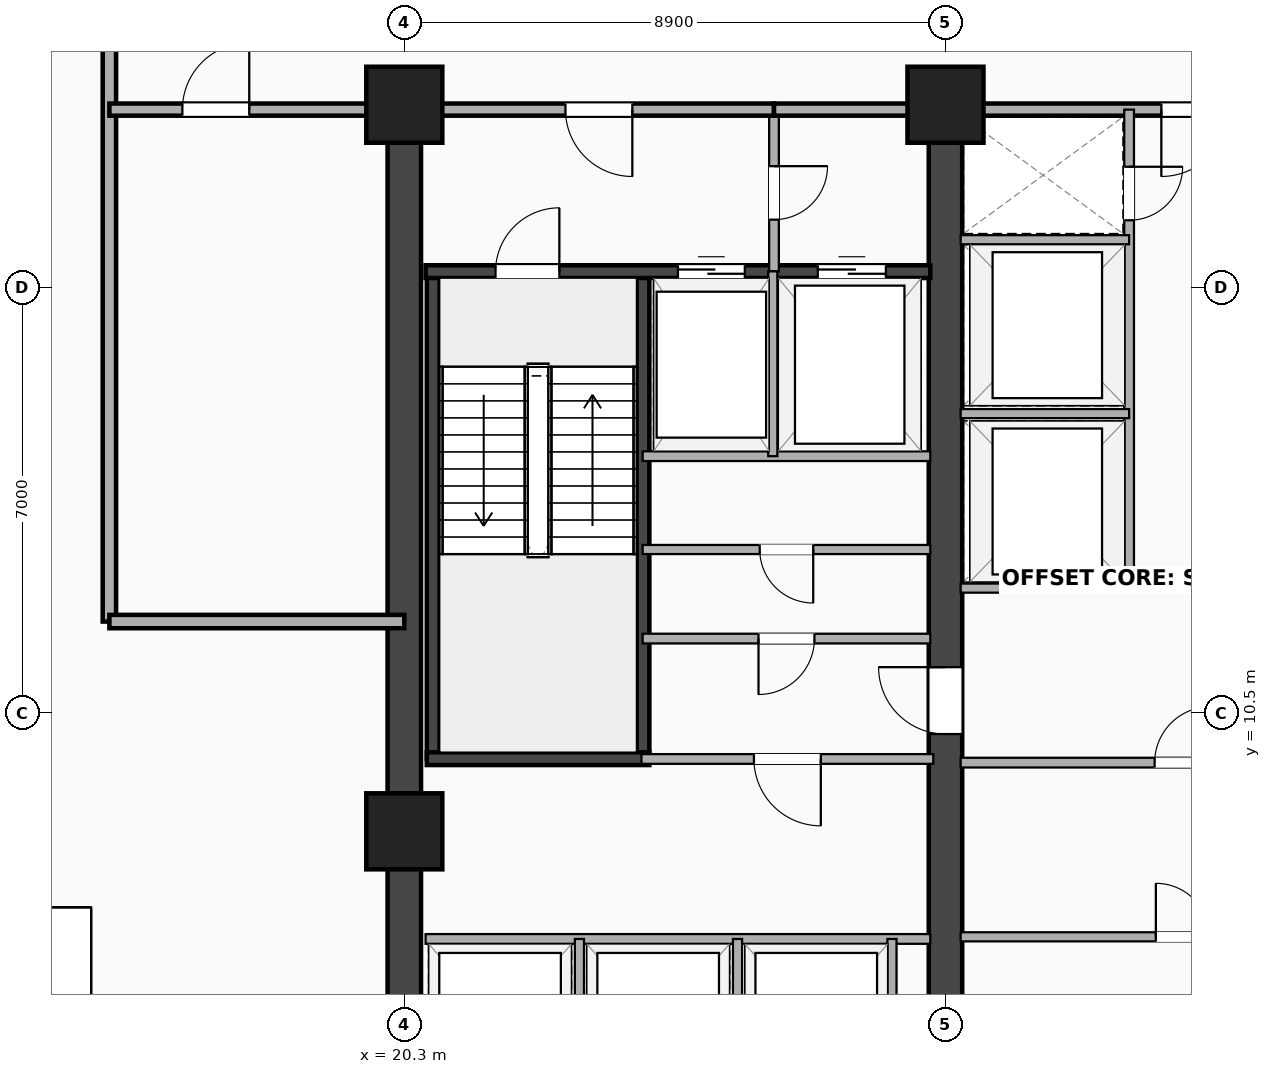
"""IFC4 building model, lengths in metres.
Left out: names, types, materials, properties, quantities, classifications, styles, units other than length and angle.
Written with IfcOpenShell. Run it as: python <this file> out.ifc"""

import sys

from ifc_helpers import new_model, si_unit, direction, frame, frame_2d, origin, origin_2d, place, context, subcontext, project, spatial, rectangle, extrude, element, fill, save


model = new_model("IFC4")
c1 = context("Model", 3, precision=1e-05, world=origin(), true_north=direction((0.0, 1.0)))
c2 = subcontext(c1, "Body", "Model", "MODEL_VIEW")
j1 = project(units=[si_unit("LENGTHUNIT", "METRE"), si_unit("PLANEANGLEUNIT", "RADIAN")], contexts=[c1])
p1 = place(None, origin())
s1 = spatial("IfcSite", under=j1, at=p1, CompositionType="ELEMENT")
p2 = place(p1, origin())
s2 = spatial("IfcBuilding", under=s1, at=p2, CompositionType="ELEMENT")
p3 = place(p2, frame((0.0, 0.0, 130.2)))
s3 = spatial("IfcBuildingStorey", under=s2, at=p3, CompositionType="ELEMENT", Elevation=130.2)
p4 = place(p3, frame((20.3, 3.5, 0.0), z_axis=(0.0, 0.0, 1.0), x_axis=(0.0, 1.0, 0.0)))
e1 = element("IfcWall", 1, at=p4, inside=s3, PredefinedType="SHEAR", context=c2, shape_type="SweptSolid", body=[
    extrude(rectangle(XDim=16.9, YDim=0.55, at=frame_2d((8.45, 0.0))), origin(), (0.0, 0.0, 1.0), 8.15),
])
p5 = place(p3, frame((29.2, 3.5, 0.0), z_axis=(0.0, 0.0, 1.0), x_axis=(0.0, 1.0, 0.0)))
e2 = element("IfcWall", 2, at=p5, inside=s3, PredefinedType="SHEAR", context=c2, shape_type="SweptSolid", body=[
    extrude(rectangle(XDim=16.9, YDim=0.55, at=frame_2d((8.45, 0.0))), origin(), (0.0, 0.0, 1.0), 8.15),
])
p6 = place(p5, frame((7.75, 0.0, 0.0), z_axis=(0.0, 0.0, 1.0), x_axis=(-1.0, 0.0, 0.0)))
e3 = element("IfcOpeningElement", 3, at=p6, cuts=e2, PredefinedType="OPENING", context=c2, shape_type="SweptSolid", body=[
    extrude(rectangle(XDim=1.1, YDim=2.15, at=frame_2d((0.55, 1.075))), frame((0.0, 0.285, 0.0), z_axis=(0.0, -1.0, 0.0), x_axis=(1.0, 0.0, 0.0)), (0.0, 0.0, 1.0), 0.57),
])
for number, where, z_axis, x_axis in (
    (4, (20.775, 9.745, 0.0), (0.0, 0.0, 1.0), (0.0, 1.0, 0.0)),
    (5, (24.225, 9.745, 0.0), (0.0, 0.0, 1.0), (0.0, 1.0, 0.0)),
):
    element("IfcWall", number, at=place(p3, frame(where, z_axis=z_axis, x_axis=x_axis)), inside=s3, PredefinedType="SHEAR", context=c2, shape_type="SweptSolid", body=[
        extrude(rectangle(XDim=8.01, YDim=0.21, at=frame_2d((4.005, 0.0))), origin(), (0.0, 0.0, 1.0), 8.15),
    ])
p7 = place(p3, frame((20.67, 9.745, 0.0), z_axis=(0.0, 0.0, 1.0), x_axis=(1.0, 0.0, 0.0)))
e6 = element("IfcWall", 6, at=p7, inside=s3, PredefinedType="SHEAR", context=c2, shape_type="SweptSolid", body=[
    extrude(rectangle(XDim=3.66, YDim=0.21, at=frame_2d((1.83, 0.0))), origin(), (0.0, 0.0, 1.0), 8.15),
])
p8 = place(p3, frame((20.65, 17.755, 0.0), z_axis=(0.0, 0.0, 1.0), x_axis=(1.0, 0.0, 0.0)))
e7 = element("IfcWall", 7, at=p8, inside=s3, PredefinedType="SHEAR", context=c2, shape_type="SweptSolid", body=[
    extrude(rectangle(XDim=8.3, YDim=0.21, at=frame_2d((4.15, 0.0))), origin(), (0.0, 0.0, 1.0), 8.15),
])
p9 = place(p8, frame((2.2, 0.0, 0.0), z_axis=(0.0, 0.0, 1.0), x_axis=(-1.0, 0.0, 0.0)))
e8 = element("IfcOpeningElement", 8, at=p9, cuts=e7, PredefinedType="OPENING", context=c2, shape_type="SweptSolid", body=[
    extrude(rectangle(XDim=1.05, YDim=2.15, at=frame_2d((0.525, 1.075))), frame((0.0, 0.115, 0.0), z_axis=(0.0, -1.0, 0.0), x_axis=(1.0, 0.0, 0.0)), (0.0, 0.0, 1.0), 0.23),
])
p10 = place(p8, frame((4.15, 0.0, 0.0)))
e9 = element("IfcOpeningElement", 9, at=p10, cuts=e7, PredefinedType="OPENING", context=c2, shape_type="SweptSolid", body=[
    extrude(rectangle(XDim=1.1, YDim=2.18, at=frame_2d((0.55, 1.09))), frame((0.0, 0.115, 0.0), z_axis=(0.0, -1.0, 0.0), x_axis=(1.0, 0.0, 0.0)), (0.0, 0.0, 1.0), 0.23),
])
p11 = place(p8, frame((6.45, 0.0, 0.0)))
e10 = element("IfcOpeningElement", 10, at=p11, cuts=e7, PredefinedType="OPENING", context=c2, shape_type="SweptSolid", body=[
    extrude(rectangle(XDim=1.12, YDim=2.2, at=frame_2d((0.56, 1.1))), frame((0.0, 0.115, 0.0), z_axis=(0.0, -1.0, 0.0), x_axis=(1.0, 0.0, 0.0)), (0.0, 0.0, 1.0), 0.23),
])
for number, where, z_axis, x_axis in (
    (11, (20.3, 8.55, -0.32), (0.0, 0.0, 1.0), (1.0, 0.0, 0.0)),
    (12, (20.3, 20.5, -0.32), (0.0, 0.0, 1.0), (1.0, 0.0, 0.0)),
    (13, (29.2, 20.5, -0.32), (0.0, 0.0, 1.0), (1.0, 0.0, 0.0)),
):
    element("IfcColumn", number, at=place(p3, frame(where, z_axis=z_axis, x_axis=x_axis)), inside=s3, PredefinedType="COLUMN", context=c2, shape_type="SweptSolid", body=[
        extrude(rectangle(XDim=1.25, YDim=1.25, at=origin_2d()), origin(), (0.0, 0.0, 1.0), 8.47),
    ])
p12 = place(p3, frame((26.38, 17.76, 0.0), z_axis=(0.0, 0.0, 1.0), x_axis=(0.0, 1.0, 0.0)))
e14 = element("IfcWall", 14, at=p12, inside=s3, PredefinedType="PARTITIONING", context=c2, shape_type="SweptSolid", body=[
    extrude(rectangle(XDim=2.66, YDim=0.16, at=frame_2d((1.33, 0.0))), origin(), (0.0, 0.0, 1.0), 7.524),
])
p13 = place(p12, frame((0.85, 0.0, 0.0)))
e15 = element("IfcOpeningElement", 15, at=p13, cuts=e14, PredefinedType="OPENING", context=c2, shape_type="SweptSolid", body=[
    extrude(rectangle(XDim=0.88, YDim=2.08, at=frame_2d((0.44, 1.04))), frame((0.0, 0.09, 0.0), z_axis=(0.0, -1.0, 0.0), x_axis=(1.0, 0.0, 0.0)), (0.0, 0.0, 1.0), 0.18),
])
p14 = place(p3, frame((24.22, 14.72, 0.0), z_axis=(0.0, 0.0, 1.0), x_axis=(1.0, 0.0, 0.0)))
e16 = element("IfcWall", 16, at=p14, inside=s3, PredefinedType="PARTITIONING", context=c2, shape_type="SweptSolid", body=[
    extrude(rectangle(XDim=4.73, YDim=0.16, at=frame_2d((2.365, 0.0))), origin(), (0.0, 0.0, 1.0), 8.15),
])
p15 = place(p3, frame((26.36, 14.72, 0.0), z_axis=(0.0, 0.0, 1.0), x_axis=(0.0, 1.0, 0.0)))
e17 = element("IfcWall", 17, at=p15, inside=s3, PredefinedType="PARTITIONING", context=c2, shape_type="SweptSolid", body=[
    extrude(rectangle(XDim=3.04, YDim=0.15, at=frame_2d((1.52, 0.0))), origin(), (0.0, 0.0, 1.0), 8.15),
])
p16 = place(p3, frame((20.65, 20.42, 0.0), z_axis=(0.0, 0.0, 1.0), x_axis=(1.0, 0.0, 0.0)))
e18 = element("IfcWall", 18, at=p16, inside=s3, PredefinedType="PARTITIONING", context=c2, shape_type="SweptSolid", body=[
    extrude(rectangle(XDim=5.73, YDim=0.2, at=frame_2d((2.865, 0.0))), origin(), (0.0, 0.0, 1.0), 7.223),
])
p17 = place(p16, frame((2.3, 0.0, 0.0)))
e19 = element("IfcOpeningElement", 19, at=p17, cuts=e18, PredefinedType="OPENING", context=c2, shape_type="SweptSolid", body=[
    extrude(rectangle(XDim=1.1, YDim=2.15, at=frame_2d((0.55, 1.075))), frame((0.0, 0.11, 0.0), z_axis=(0.0, -1.0, 0.0), x_axis=(1.0, 0.0, 0.0)), (0.0, 0.0, 1.0), 0.22),
])
p18 = place(p3, frame((26.38, 20.42, 0.0), z_axis=(0.0, 0.0, 1.0), x_axis=(1.0, 0.0, 0.0)))
e20 = element("IfcWall", 20, at=p18, inside=s3, PredefinedType="PARTITIONING", context=c2, shape_type="SweptSolid", body=[
    extrude(rectangle(XDim=2.82, YDim=0.2, at=frame_2d((1.41, 0.0))), origin(), (0.0, 0.0, 1.0), 7.223),
])
p19 = place(p3, frame((29.2, 20.42, 0.0), z_axis=(0.0, 0.0, 1.0), x_axis=(1.0, 0.0, 0.0)))
e21 = element("IfcWall", 21, at=p19, inside=s3, PredefinedType="PARTITIONING", context=c2, shape_type="SweptSolid", body=[
    extrude(rectangle(XDim=7.8, YDim=0.2, at=frame_2d((3.9, 0.0))), origin(), (0.0, 0.0, 1.0), 7.223),
])
p20 = place(p19, frame((3.55, 0.0, 0.0)))
e22 = element("IfcOpeningElement", 22, at=p20, cuts=e21, PredefinedType="OPENING", context=c2, shape_type="SweptSolid", body=[
    extrude(rectangle(XDim=1.1, YDim=2.15, at=frame_2d((0.55, 1.075))), frame((0.0, 0.11, 0.0), z_axis=(0.0, -1.0, 0.0), x_axis=(1.0, 0.0, 0.0)), (0.0, 0.0, 1.0), 0.22),
])
p21 = place(p3, frame((24.22, 11.72, 0.0), z_axis=(0.0, 0.0, 1.0), x_axis=(1.0, 0.0, 0.0)))
e23 = element("IfcWall", 23, at=p21, inside=s3, PredefinedType="PARTITIONING", context=c2, shape_type="SweptSolid", body=[
    extrude(rectangle(XDim=4.73, YDim=0.16, at=frame_2d((2.365, 0.0))), origin(), (0.0, 0.0, 1.0), 8.15),
])
p22 = place(p21, frame((1.905, 0.0, 0.0)))
e24 = element("IfcOpeningElement", 24, at=p22, cuts=e23, PredefinedType="OPENING", context=c2, shape_type="SweptSolid", body=[
    extrude(rectangle(XDim=0.92, YDim=2.08, at=frame_2d((0.46, 1.04))), frame((0.0, 0.09, 0.0), z_axis=(0.0, -1.0, 0.0), x_axis=(1.0, 0.0, 0.0)), (0.0, 0.0, 1.0), 0.18),
])
p23 = place(p3, frame((24.22, 13.185, 0.0), z_axis=(0.0, 0.0, 1.0), x_axis=(1.0, 0.0, 0.0)))
e25 = element("IfcWall", 25, at=p23, inside=s3, PredefinedType="PARTITIONING", context=c2, shape_type="SweptSolid", body=[
    extrude(rectangle(XDim=4.73, YDim=0.15, at=frame_2d((2.365, 0.0))), origin(), (0.0, 0.0, 1.0), 8.15),
])
p24 = place(p23, frame((1.925, 0.0, 0.0)))
e26 = element("IfcOpeningElement", 26, at=p24, cuts=e25, PredefinedType="OPENING", context=c2, shape_type="SweptSolid", body=[
    extrude(rectangle(XDim=0.88, YDim=2.08, at=frame_2d((0.44, 1.04))), frame((0.0, 0.085, 0.0), z_axis=(0.0, -1.0, 0.0), x_axis=(1.0, 0.0, 0.0)), (0.0, 0.0, 1.0), 0.17),
])
p25 = place(p3, frame((20.65, 6.78, 0.0), z_axis=(0.0, 0.0, 1.0), x_axis=(1.0, 0.0, 0.0)))
e27 = element("IfcWall", 27, at=p25, inside=s3, PredefinedType="PARTITIONING", context=c2, shape_type="SweptSolid", body=[
    extrude(rectangle(XDim=8.3, YDim=0.16, at=frame_2d((4.15, 0.0))), origin(), (0.0, 0.0, 1.0), 7.223),
])
for number, where, z_axis, x_axis in (
    (28, (23.18, 3.9, 0.0), (0.0, 0.0, 1.0), (0.0, 1.0, 0.0)),
    (29, (25.78, 3.9, 0.0), (0.0, 0.0, 1.0), (0.0, 1.0, 0.0)),
    (30, (28.32, 3.9, 0.0), (0.0, 0.0, 1.0), (0.0, 1.0, 0.0)),
):
    element("IfcWall", number, at=place(p3, frame(where, z_axis=z_axis, x_axis=x_axis)), inside=s3, PredefinedType="PARTITIONING", context=c2, shape_type="SweptSolid", body=[
        extrude(rectangle(XDim=2.88, YDim=0.15, at=frame_2d((1.44, 0.0))), origin(), (0.0, 0.0, 1.0), 8.15),
    ])
p26 = place(p3, frame((24.2, 9.74, 0.0), z_axis=(0.0, 0.0, 1.0), x_axis=(1.0, 0.0, 0.0)))
e31 = element("IfcWall", 31, at=p26, inside=s3, PredefinedType="PARTITIONING", context=c2, shape_type="SweptSolid", body=[
    extrude(rectangle(XDim=4.8, YDim=0.16, at=frame_2d((2.4, 0.0))), origin(), (0.0, 0.0, 1.0), 8.15),
])
p27 = place(p26, frame((1.85, 0.0, 0.0)))
e32 = element("IfcOpeningElement", 32, at=p27, cuts=e31, PredefinedType="OPENING", context=c2, shape_type="SweptSolid", body=[
    extrude(rectangle(XDim=1.1, YDim=2.15, at=frame_2d((0.55, 1.075))), frame((0.0, 0.09, 0.0), z_axis=(0.0, -1.0, 0.0), x_axis=(1.0, 0.0, 0.0)), (0.0, 0.0, 1.0), 0.18),
])
p28 = place(p3, frame((29.45, 9.68, 0.0), z_axis=(0.0, 0.0, 1.0), x_axis=(1.0, 0.0, 0.0)))
e33 = element("IfcWall", 33, at=p28, inside=s3, PredefinedType="PARTITIONING", context=c2, shape_type="SweptSolid", body=[
    extrude(rectangle(XDim=7.3, YDim=0.16, at=frame_2d((3.65, 0.0))), origin(), (0.0, 0.0, 1.0), 8.15),
])
p29 = place(p28, frame((4.11, 0.0, 0.0), z_axis=(0.0, 0.0, 1.0), x_axis=(-1.0, 0.0, 0.0)))
e34 = element("IfcOpeningElement", 34, at=p29, cuts=e33, PredefinedType="OPENING", context=c2, shape_type="SweptSolid", body=[
    extrude(rectangle(XDim=0.92, YDim=2.08, at=frame_2d((0.46, 1.04))), frame((0.0, 0.09, 0.0), z_axis=(0.0, -1.0, 0.0), x_axis=(1.0, 0.0, 0.0)), (0.0, 0.0, 1.0), 0.18),
])
p30 = place(p3, frame((29.45, 6.815, 0.0), z_axis=(0.0, 0.0, 1.0), x_axis=(1.0, 0.0, 0.0)))
e35 = element("IfcWall", 35, at=p30, inside=s3, PredefinedType="PARTITIONING", context=c2, shape_type="SweptSolid", body=[
    extrude(rectangle(XDim=7.3, YDim=0.15, at=frame_2d((3.65, 0.0))), origin(), (0.0, 0.0, 1.0), 8.15),
])
p31 = place(p30, frame((4.09, 0.0, 0.0), z_axis=(0.0, 0.0, 1.0), x_axis=(-1.0, 0.0, 0.0)))
e36 = element("IfcOpeningElement", 36, at=p31, cuts=e35, PredefinedType="OPENING", context=c2, shape_type="SweptSolid", body=[
    extrude(rectangle(XDim=0.88, YDim=2.08, at=frame_2d((0.44, 1.04))), frame((0.0, 0.085, 0.0), z_axis=(0.0, -1.0, 0.0), x_axis=(1.0, 0.0, 0.0)), (0.0, 0.0, 1.0), 0.17),
])
p32 = place(p3, frame((32.22, 12.5, 0.0), z_axis=(0.0, 0.0, 1.0), x_axis=(0.0, 1.0, 0.0)))
e37 = element("IfcWall", 37, at=p32, inside=s3, PredefinedType="PARTITIONING", context=c2, shape_type="SweptSolid", body=[
    extrude(rectangle(XDim=7.92, YDim=0.16, at=frame_2d((3.96, 0.0))), origin(), (0.0, 0.0, 1.0), 7.524),
])
p33 = place(p32, frame((6.1, 0.0, 0.0)))
e38 = element("IfcOpeningElement", 38, at=p33, cuts=e37, PredefinedType="OPENING", context=c2, shape_type="SweptSolid", body=[
    extrude(rectangle(XDim=0.88, YDim=2.08, at=frame_2d((0.44, 1.04))), frame((0.0, 0.09, 0.0), z_axis=(0.0, -1.0, 0.0), x_axis=(1.0, 0.0, 0.0)), (0.0, 0.0, 1.0), 0.18),
])
for number, where, z_axis, x_axis in (
    (39, (29.45, 12.55, 0.0), (0.0, 0.0, 1.0), (1.0, 0.0, 0.0)),
    (40, (29.45, 15.42, 0.0), (0.0, 0.0, 1.0), (1.0, 0.0, 0.0)),
    (41, (29.45, 18.28, 0.0), (0.0, 0.0, 1.0), (1.0, 0.0, 0.0)),
):
    element("IfcWall", number, at=place(p3, frame(where, z_axis=z_axis, x_axis=x_axis)), inside=s3, PredefinedType="PARTITIONING", context=c2, shape_type="SweptSolid", body=[
        extrude(rectangle(XDim=2.77, YDim=0.15, at=frame_2d((1.385, 0.0))), origin(), (0.0, 0.0, 1.0), 8.15),
    ])
p34 = place(p3, frame((15.45, 12.0, 0.0), z_axis=(0.0, 0.0, 1.0), x_axis=(0.0, 1.0, 0.0)))
e42 = element("IfcWall", 42, at=p34, inside=s3, PredefinedType="PARTITIONING", context=c2, shape_type="SweptSolid", body=[
    extrude(rectangle(XDim=20.8, YDim=0.22, at=frame_2d((10.4, 0.0))), origin(), (0.0, 0.0, 1.0), 7.223),
])
p35 = place(p3, frame((15.45, 12.0, 0.0), z_axis=(0.0, 0.0, 1.0), x_axis=(1.0, 0.0, 0.0)))
e43 = element("IfcWall", 43, at=p35, inside=s3, PredefinedType="PARTITIONING", context=c2, shape_type="SweptSolid", body=[
    extrude(rectangle(XDim=4.85, YDim=0.22, at=frame_2d((2.425, 0.0))), origin(), (0.0, 0.0, 1.0), 7.223),
])
p36 = place(p3, frame((15.45, 20.42, 0.0), z_axis=(0.0, 0.0, 1.0), x_axis=(1.0, 0.0, 0.0)))
e44 = element("IfcWall", 44, at=p36, inside=s3, PredefinedType="PARTITIONING", context=c2, shape_type="SweptSolid", body=[
    extrude(rectangle(XDim=4.85, YDim=0.2, at=frame_2d((2.425, 0.0))), origin(), (0.0, 0.0, 1.0), 7.223),
])
p37 = place(p36, frame((2.3, 0.0, 0.0), z_axis=(0.0, 0.0, 1.0), x_axis=(-1.0, 0.0, 0.0)))
e45 = element("IfcOpeningElement", 45, at=p37, cuts=e44, PredefinedType="OPENING", context=c2, shape_type="SweptSolid", body=[
    extrude(rectangle(XDim=1.1, YDim=2.15, at=frame_2d((0.55, 1.075))), frame((0.0, 0.11, 0.0), z_axis=(0.0, -1.0, 0.0), x_axis=(1.0, 0.0, 0.0)), (0.0, 0.0, 1.0), 0.22),
])
p38 = place(p9, origin())
e46 = element("IfcDoor", 46, at=p38, inside=s3, OperationType="SINGLE_SWING_RIGHT", PredefinedType="DOOR", context=c2, shape_type="SweptSolid", body=[
    extrude(rectangle(XDim=1.05, YDim=2.15, at=frame_2d((0.525, 1.075))), frame((0.0, 0.025, 0.0), z_axis=(0.0, -1.0, 0.0), x_axis=(1.0, 0.0, 0.0)), (0.0, 0.0, 1.0), 0.05),
])
fill(e8, e46)
p39 = place(p10, origin())
e47 = element("IfcDoor", 47, at=p39, inside=s3, OperationType="DOUBLE_DOOR_SLIDING", PredefinedType="DOOR", context=c2, shape_type="SweptSolid", body=[
    extrude(rectangle(XDim=1.1, YDim=2.18, at=frame_2d((0.55, 1.09))), frame((0.0, 0.025, 0.0), z_axis=(0.0, -1.0, 0.0), x_axis=(1.0, 0.0, 0.0)), (0.0, 0.0, 1.0), 0.05),
])
fill(e9, e47)
p40 = place(p11, origin())
e48 = element("IfcDoor", 48, at=p40, inside=s3, OperationType="DOUBLE_DOOR_SLIDING", PredefinedType="DOOR", context=c2, shape_type="SweptSolid", body=[
    extrude(rectangle(XDim=1.12, YDim=2.2, at=frame_2d((0.56, 1.1))), frame((0.0, 0.025, 0.0), z_axis=(0.0, -1.0, 0.0), x_axis=(1.0, 0.0, 0.0)), (0.0, 0.0, 1.0), 0.05),
])
fill(e10, e48)
p41 = place(p6, origin())
e49 = element("IfcDoor", 49, at=p41, inside=s3, OperationType="SINGLE_SWING_RIGHT", PredefinedType="DOOR", context=c2, shape_type="SweptSolid", body=[
    extrude(rectangle(XDim=1.1, YDim=2.15, at=frame_2d((0.55, 1.075))), frame((0.0, 0.025, 0.0), z_axis=(0.0, -1.0, 0.0), x_axis=(1.0, 0.0, 0.0)), (0.0, 0.0, 1.0), 0.05),
])
fill(e3, e49)
p42 = place(p13, origin())
e50 = element("IfcDoor", 50, at=p42, inside=s3, OperationType="SINGLE_SWING_RIGHT", PredefinedType="DOOR", context=c2, shape_type="SweptSolid", body=[
    extrude(rectangle(XDim=0.88, YDim=2.08, at=frame_2d((0.44, 1.04))), frame((0.0, 0.025, 0.0), z_axis=(0.0, -1.0, 0.0), x_axis=(1.0, 0.0, 0.0)), (0.0, 0.0, 1.0), 0.05),
])
fill(e15, e50)
p43 = place(p17, origin())
e51 = element("IfcDoor", 51, at=p43, inside=s3, OperationType="SINGLE_SWING_RIGHT", PredefinedType="DOOR", context=c2, shape_type="SweptSolid", body=[
    extrude(rectangle(XDim=1.1, YDim=2.15, at=frame_2d((0.55, 1.075))), frame((0.0, 0.025, 0.0), z_axis=(0.0, -1.0, 0.0), x_axis=(1.0, 0.0, 0.0)), (0.0, 0.0, 1.0), 0.05),
])
fill(e19, e51)
p44 = place(p20, origin())
e52 = element("IfcDoor", 52, at=p44, inside=s3, OperationType="SINGLE_SWING_LEFT", PredefinedType="DOOR", context=c2, shape_type="SweptSolid", body=[
    extrude(rectangle(XDim=1.1, YDim=2.15, at=frame_2d((0.55, 1.075))), frame((0.0, 0.025, 0.0), z_axis=(0.0, -1.0, 0.0), x_axis=(1.0, 0.0, 0.0)), (0.0, 0.0, 1.0), 0.05),
])
fill(e22, e52)
p45 = place(p22, origin())
e53 = element("IfcDoor", 53, at=p45, inside=s3, OperationType="SINGLE_SWING_LEFT", PredefinedType="DOOR", context=c2, shape_type="SweptSolid", body=[
    extrude(rectangle(XDim=0.92, YDim=2.08, at=frame_2d((0.46, 1.04))), frame((0.0, 0.025, 0.0), z_axis=(0.0, -1.0, 0.0), x_axis=(1.0, 0.0, 0.0)), (0.0, 0.0, 1.0), 0.05),
])
fill(e24, e53)
p46 = place(p24, origin())
e54 = element("IfcDoor", 54, at=p46, inside=s3, OperationType="SINGLE_SWING_RIGHT", PredefinedType="DOOR", context=c2, shape_type="SweptSolid", body=[
    extrude(rectangle(XDim=0.88, YDim=2.08, at=frame_2d((0.44, 1.04))), frame((0.0, 0.025, 0.0), z_axis=(0.0, -1.0, 0.0), x_axis=(1.0, 0.0, 0.0)), (0.0, 0.0, 1.0), 0.05),
])
fill(e26, e54)
p47 = place(p27, origin())
e55 = element("IfcDoor", 55, at=p47, inside=s3, OperationType="SINGLE_SWING_RIGHT", PredefinedType="DOOR", context=c2, shape_type="SweptSolid", body=[
    extrude(rectangle(XDim=1.1, YDim=2.15, at=frame_2d((0.55, 1.075))), frame((0.0, 0.025, 0.0), z_axis=(0.0, -1.0, 0.0), x_axis=(1.0, 0.0, 0.0)), (0.0, 0.0, 1.0), 0.05),
])
fill(e32, e55)
p48 = place(p29, origin())
e56 = element("IfcDoor", 56, at=p48, inside=s3, OperationType="SINGLE_SWING_RIGHT", PredefinedType="DOOR", context=c2, shape_type="SweptSolid", body=[
    extrude(rectangle(XDim=0.92, YDim=2.08, at=frame_2d((0.46, 1.04))), frame((0.0, 0.025, 0.0), z_axis=(0.0, -1.0, 0.0), x_axis=(1.0, 0.0, 0.0)), (0.0, 0.0, 1.0), 0.05),
])
fill(e34, e56)
p49 = place(p31, origin())
e57 = element("IfcDoor", 57, at=p49, inside=s3, OperationType="SINGLE_SWING_LEFT", PredefinedType="DOOR", context=c2, shape_type="SweptSolid", body=[
    extrude(rectangle(XDim=0.88, YDim=2.08, at=frame_2d((0.44, 1.04))), frame((0.0, 0.025, 0.0), z_axis=(0.0, -1.0, 0.0), x_axis=(1.0, 0.0, 0.0)), (0.0, 0.0, 1.0), 0.05),
])
fill(e36, e57)
p50 = place(p33, origin())
e58 = element("IfcDoor", 58, at=p50, inside=s3, OperationType="SINGLE_SWING_RIGHT", PredefinedType="DOOR", context=c2, shape_type="SweptSolid", body=[
    extrude(rectangle(XDim=0.88, YDim=2.08, at=frame_2d((0.44, 1.04))), frame((0.0, 0.025, 0.0), z_axis=(0.0, -1.0, 0.0), x_axis=(1.0, 0.0, 0.0)), (0.0, 0.0, 1.0), 0.05),
])
fill(e38, e58)
p51 = place(p37, origin())
e59 = element("IfcDoor", 59, at=p51, inside=s3, OperationType="SINGLE_SWING_RIGHT", PredefinedType="DOOR", context=c2, shape_type="SweptSolid", body=[
    extrude(rectangle(XDim=1.1, YDim=2.15, at=frame_2d((0.55, 1.075))), frame((0.0, 0.025, 0.0), z_axis=(0.0, -1.0, 0.0), x_axis=(1.0, 0.0, 0.0)), (0.0, 0.0, 1.0), 0.05),
])
fill(e45, e59)
save(model, sys.argv[1])
